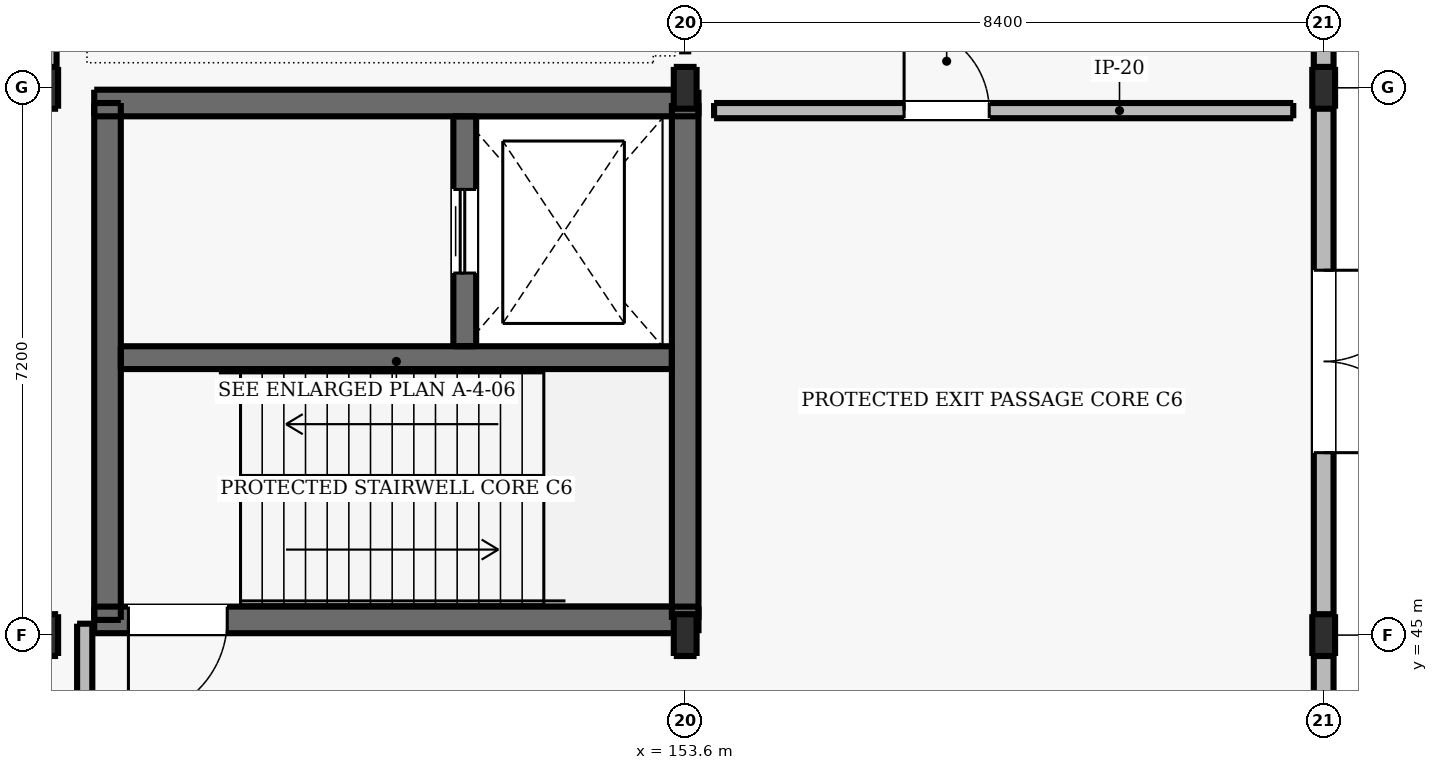
"""IFC4 building model, lengths in metres.
Left out: names, types, materials, properties, quantities, classifications, styles, units other than length and angle.
Written with IfcOpenShell. Run it as: python <this file> out.ifc"""

import sys

from ifc_helpers import new_model, si_unit, direction, frame, frame_2d, origin, origin_2d, place, context, subcontext, project, spatial, rectangle, i_section, extrude, element, fill, save


model = new_model("IFC4")
c1 = context("Model", 3, precision=1e-05, world=origin(), true_north=direction((0.0, 1.0)))
c2 = subcontext(c1, "Body", "Model", "MODEL_VIEW")
j1 = project(units=[si_unit("LENGTHUNIT", "METRE"), si_unit("PLANEANGLEUNIT", "RADIAN")], contexts=[c1])
p1 = place(None, origin())
s1 = spatial("IfcSite", under=j1, at=p1, CompositionType="ELEMENT")
p2 = place(p1, origin())
s2 = spatial("IfcBuilding", under=s1, at=p2, CompositionType="ELEMENT")
p3 = place(p2, origin())
s3 = spatial("IfcBuildingStorey", under=s2, at=p3, CompositionType="ELEMENT", Elevation=0.0)
for number, where, z_axis, x_axis in (
    (1, (145.2, 45.0, 0.0), (0.0, 0.0, 1.0), (1.0, 0.0, 0.0)),
    (2, (145.2, 52.2, 0.0), (0.0, 0.0, 1.0), (1.0, 0.0, 0.0)),
    (3, (153.6, 45.0, 0.0), (0.0, 0.0, 1.0), (1.0, 0.0, 0.0)),
    (4, (153.6, 52.2, 0.0), (0.0, 0.0, 1.0), (1.0, 0.0, 0.0)),
    (5, (162.0, 45.0, 0.0), (0.0, 0.0, 1.0), (1.0, 0.0, 0.0)),
    (6, (162.0, 52.2, 0.0), (0.0, 0.0, 1.0), (1.0, 0.0, 0.0)),
):
    element("IfcColumn", number, at=place(p3, frame(where, z_axis=z_axis, x_axis=x_axis)), inside=s3, PredefinedType="COLUMN", context=c2, shape_type="SweptSolid", body=[
        extrude(i_section(OverallWidth=0.3, OverallDepth=0.55, WebThickness=0.015, FlangeThickness=0.029, FilletRadius=0.027, at=origin_2d()), origin(), (0.0, 0.0, 1.0), 5.1),
    ])
p4 = place(p3, frame((145.825, 45.2, 0.0), z_axis=(0.0, 0.0, 1.0), x_axis=(1.0, 0.0, 0.0)))
e7 = element("IfcWall", 7, at=p4, inside=s3, PredefinedType="SHEAR", context=c2, shape_type="SweptSolid", body=[
    extrude(rectangle(XDim=7.95, YDim=0.35, at=frame_2d((3.975, 0.0))), origin(), (0.0, 0.0, 1.0), 5.1),
])
p5 = place(p4, frame((0.45, 0.0, 0.0)))
e8 = element("IfcOpeningElement", 8, at=p5, cuts=e7, PredefinedType="OPENING", context=c2, shape_type="SweptSolid", body=[
    extrude(rectangle(XDim=1.3, YDim=2.15, at=frame_2d((0.65, 1.075))), frame((0.0, 0.185, 0.0), z_axis=(0.0, -1.0, 0.0), x_axis=(1.0, 0.0, 0.0)), (0.0, 0.0, 1.0), 0.37),
])
p6 = place(p3, frame((145.825, 52.0, 0.0), z_axis=(0.0, 0.0, 1.0), x_axis=(1.0, 0.0, 0.0)))
e9 = element("IfcWall", 9, at=p6, inside=s3, PredefinedType="SHEAR", context=c2, shape_type="SweptSolid", body=[
    extrude(rectangle(XDim=7.95, YDim=0.35, at=frame_2d((3.975, 0.0))), origin(), (0.0, 0.0, 1.0), 5.1),
])
for number, where, z_axis, x_axis in (
    (10, (146.0, 45.2, 0.0), (0.0, 0.0, 1.0), (0.0, 1.0, 0.0)),
    (11, (153.6, 45.2, 0.0), (0.0, 0.0, 1.0), (0.0, 1.0, 0.0)),
):
    element("IfcWall", number, at=place(p3, frame(where, z_axis=z_axis, x_axis=x_axis)), inside=s3, PredefinedType="SHEAR", context=c2, shape_type="SweptSolid", body=[
        extrude(rectangle(XDim=6.8, YDim=0.35, at=frame_2d((3.4, 0.0))), origin(), (0.0, 0.0, 1.0), 5.1),
    ])
p7 = place(p3, frame((146.175, 48.65, 0.0), z_axis=(0.0, 0.0, 1.0), x_axis=(1.0, 0.0, 0.0)))
e12 = element("IfcWall", 12, at=p7, inside=s3, PredefinedType="SHEAR", context=c2, shape_type="SweptSolid", body=[
    extrude(rectangle(XDim=7.25, YDim=0.3, at=frame_2d((3.625, 0.0))), origin(), (0.0, 0.0, 1.0), 5.1),
])
p8 = place(p3, frame((150.7, 48.8, 0.0), z_axis=(0.0, 0.0, 1.0), x_axis=(0.0, 1.0, 0.0)))
e13 = element("IfcWall", 13, at=p8, inside=s3, PredefinedType="SHEAR", context=c2, shape_type="SweptSolid", body=[
    extrude(rectangle(XDim=3.025, YDim=0.3, at=frame_2d((1.512, 0.0))), origin(), (0.0, 0.0, 1.0), 5.1),
])
p9 = place(p8, frame((0.963, 0.0, 0.0)))
e14 = element("IfcOpeningElement", 14, at=p9, cuts=e13, PredefinedType="OPENING", context=c2, shape_type="SweptSolid", body=[
    extrude(rectangle(XDim=1.1, YDim=2.15, at=frame_2d((0.55, 1.075))), frame((0.0, 0.16, 0.0), z_axis=(0.0, -1.0, 0.0), x_axis=(1.0, 0.0, 0.0)), (0.0, 0.0, 1.0), 0.32),
])
p10 = place(p3, frame((145.2, 52.2, 0.0), z_axis=(0.0, 0.0, 1.0), x_axis=(0.0, 1.0, 0.0)))
e15 = element("IfcWall", 15, at=p10, inside=s3, PredefinedType="SOLIDWALL", context=c2, shape_type="SweptSolid", body=[
    extrude(rectangle(XDim=43.6, YDim=0.26, at=frame_2d((21.8, 0.0))), origin(), (0.0, 0.0, 1.0), 4.31),
])
p11 = place(p10, frame((1.522, 0.0, 1.05)))
e16 = element("IfcOpeningElement", 16, at=p11, cuts=e15, PredefinedType="OPENING", context=c2, shape_type="SweptSolid", body=[
    extrude(rectangle(XDim=1.8, YDim=1.65, at=frame_2d((0.9, 0.825))), frame((0.0, 0.14, 0.0), z_axis=(0.0, -1.0, 0.0), x_axis=(1.0, 0.0, 0.0)), (0.0, 0.0, 1.0), 0.28),
])
p12 = place(p10, frame((6.367, 0.0, 1.05)))
e17 = element("IfcOpeningElement", 17, at=p12, cuts=e15, PredefinedType="OPENING", context=c2, shape_type="SweptSolid", body=[
    extrude(rectangle(XDim=1.8, YDim=1.65, at=frame_2d((0.9, 0.825))), frame((0.0, 0.14, 0.0), z_axis=(0.0, -1.0, 0.0), x_axis=(1.0, 0.0, 0.0)), (0.0, 0.0, 1.0), 0.28),
])
p13 = place(p10, frame((16.056, 0.0, 1.05)))
e18 = element("IfcOpeningElement", 18, at=p13, cuts=e15, PredefinedType="OPENING", context=c2, shape_type="SweptSolid", body=[
    extrude(rectangle(XDim=1.8, YDim=1.65, at=frame_2d((0.9, 0.825))), frame((0.0, 0.14, 0.0), z_axis=(0.0, -1.0, 0.0), x_axis=(1.0, 0.0, 0.0)), (0.0, 0.0, 1.0), 0.28),
])
p14 = place(p10, frame((20.9, 0.0, 1.05)))
e19 = element("IfcOpeningElement", 19, at=p14, cuts=e15, PredefinedType="OPENING", context=c2, shape_type="SweptSolid", body=[
    extrude(rectangle(XDim=1.8, YDim=1.65, at=frame_2d((0.9, 0.825))), frame((0.0, 0.14, 0.0), z_axis=(0.0, -1.0, 0.0), x_axis=(1.0, 0.0, 0.0)), (0.0, 0.0, 1.0), 0.28),
])
p15 = place(p10, frame((25.744, 0.0, 1.05)))
e20 = element("IfcOpeningElement", 20, at=p15, cuts=e15, PredefinedType="OPENING", context=c2, shape_type="SweptSolid", body=[
    extrude(rectangle(XDim=1.8, YDim=1.65, at=frame_2d((0.9, 0.825))), frame((0.0, 0.14, 0.0), z_axis=(0.0, -1.0, 0.0), x_axis=(1.0, 0.0, 0.0)), (0.0, 0.0, 1.0), 0.28),
])
p16 = place(p10, frame((30.589, 0.0, 1.05)))
e21 = element("IfcOpeningElement", 21, at=p16, cuts=e15, PredefinedType="OPENING", context=c2, shape_type="SweptSolid", body=[
    extrude(rectangle(XDim=1.8, YDim=1.65, at=frame_2d((0.9, 0.825))), frame((0.0, 0.14, 0.0), z_axis=(0.0, -1.0, 0.0), x_axis=(1.0, 0.0, 0.0)), (0.0, 0.0, 1.0), 0.28),
])
p17 = place(p10, frame((40.278, 0.0, 1.05)))
e22 = element("IfcOpeningElement", 22, at=p17, cuts=e15, PredefinedType="OPENING", context=c2, shape_type="SweptSolid", body=[
    extrude(rectangle(XDim=1.8, YDim=1.65, at=frame_2d((0.9, 0.825))), frame((0.0, 0.14, 0.0), z_axis=(0.0, -1.0, 0.0), x_axis=(1.0, 0.0, 0.0)), (0.0, 0.0, 1.0), 0.28),
])
p18 = place(p3, frame((162.0, 95.8, 0.0), z_axis=(0.0, 0.0, 1.0), x_axis=(0.0, -1.0, 0.0)))
e23 = element("IfcWall", 23, at=p18, inside=s3, PredefinedType="SOLIDWALL", context=c2, shape_type="SweptSolid", body=[
    extrude(rectangle(XDim=43.6, YDim=0.26, at=frame_2d((21.8, 0.0))), origin(), (0.0, 0.0, 1.0), 4.31),
])
p19 = place(p18, frame((10.811, 0.0, 1.05)))
e24 = element("IfcOpeningElement", 24, at=p19, cuts=e23, PredefinedType="OPENING", context=c2, shape_type="SweptSolid", body=[
    extrude(rectangle(XDim=2.6, YDim=1.75, at=frame_2d((1.3, 0.875))), frame((0.0, 0.14, 0.0), z_axis=(0.0, -1.0, 0.0), x_axis=(1.0, 0.0, 0.0)), (0.0, 0.0, 1.0), 0.28),
])
p20 = place(p18, frame((15.656, 0.0, 1.05)))
e25 = element("IfcOpeningElement", 25, at=p20, cuts=e23, PredefinedType="OPENING", context=c2, shape_type="SweptSolid", body=[
    extrude(rectangle(XDim=2.6, YDim=1.75, at=frame_2d((1.3, 0.875))), frame((0.0, 0.14, 0.0), z_axis=(0.0, -1.0, 0.0), x_axis=(1.0, 0.0, 0.0)), (0.0, 0.0, 1.0), 0.28),
])
p21 = place(p18, frame((20.5, 0.0, 1.05)))
e26 = element("IfcOpeningElement", 26, at=p21, cuts=e23, PredefinedType="OPENING", context=c2, shape_type="SweptSolid", body=[
    extrude(rectangle(XDim=2.6, YDim=1.75, at=frame_2d((1.3, 0.875))), frame((0.0, 0.14, 0.0), z_axis=(0.0, -1.0, 0.0), x_axis=(1.0, 0.0, 0.0)), (0.0, 0.0, 1.0), 0.28),
])
p22 = place(p18, frame((35.033, 0.0, 1.05)))
e27 = element("IfcOpeningElement", 27, at=p22, cuts=e23, PredefinedType="OPENING", context=c2, shape_type="SweptSolid", body=[
    extrude(rectangle(XDim=2.6, YDim=1.75, at=frame_2d((1.3, 0.875))), frame((0.0, 0.14, 0.0), z_axis=(0.0, -1.0, 0.0), x_axis=(1.0, 0.0, 0.0)), (0.0, 0.0, 1.0), 0.28),
])
p23 = place(p18, frame((39.878, 0.0, 1.05)))
e28 = element("IfcOpeningElement", 28, at=p23, cuts=e23, PredefinedType="OPENING", context=c2, shape_type="SweptSolid", body=[
    extrude(rectangle(XDim=2.6, YDim=1.75, at=frame_2d((1.3, 0.875))), frame((0.0, 0.14, 0.0), z_axis=(0.0, -1.0, 0.0), x_axis=(1.0, 0.0, 0.0)), (0.0, 0.0, 1.0), 0.28),
])
p24 = place(p3, frame((162.0, 52.2, 0.0), z_axis=(0.0, 0.0, 1.0), x_axis=(0.0, -1.0, 0.0)))
e29 = element("IfcWall", 29, at=p24, inside=s3, PredefinedType="SOLIDWALL", context=c2, shape_type="SweptSolid", body=[
    extrude(rectangle(XDim=34.2, YDim=0.26, at=frame_2d((17.1, 0.0))), origin(), (0.0, 0.0, 1.0), 4.31),
])
p25 = place(p24, frame((27.6, 0.0, 0.0)))
e30 = element("IfcOpeningElement", 30, at=p25, cuts=e29, PredefinedType="OPENING", context=c2, shape_type="SweptSolid", body=[
    extrude(rectangle(XDim=5.2, YDim=3.2, at=frame_2d((2.6, 1.6))), frame((0.0, 0.14, 0.0), z_axis=(0.0, -1.0, 0.0), x_axis=(1.0, 0.0, 0.0)), (0.0, 0.0, 1.0), 0.28),
])
p26 = place(p24, frame((19.5, 0.0, 0.0)))
e31 = element("IfcOpeningElement", 31, at=p26, cuts=e29, PredefinedType="OPENING", context=c2, shape_type="SweptSolid", body=[
    extrude(rectangle(XDim=2.4, YDim=2.5, at=frame_2d((1.2, 1.25))), frame((0.0, 0.14, 0.0), z_axis=(0.0, -1.0, 0.0), x_axis=(1.0, 0.0, 0.0)), (0.0, 0.0, 1.0), 0.28),
])
p27 = place(p24, frame((2.4, 0.0, 0.0)))
e32 = element("IfcOpeningElement", 32, at=p27, cuts=e29, PredefinedType="OPENING", context=c2, shape_type="SweptSolid", body=[
    extrude(rectangle(XDim=2.4, YDim=2.5, at=frame_2d((1.2, 1.25))), frame((0.0, 0.14, 0.0), z_axis=(0.0, -1.0, 0.0), x_axis=(1.0, 0.0, 0.0)), (0.0, 0.0, 1.0), 0.28),
])
p28 = place(p3, frame((145.7, 42.2, 0.0), z_axis=(0.0, 0.0, 1.0), x_axis=(0.0, 1.0, 0.0)))
e33 = element("IfcWall", 33, at=p28, inside=s3, PredefinedType="PARTITIONING", context=c2, shape_type="SweptSolid", body=[
    extrude(rectangle(XDim=2.95, YDim=0.2, at=frame_2d((1.475, 0.0))), origin(), (0.0, 0.0, 1.0), 4.82),
])
p29 = place(p28, frame((0.925, 0.0, 0.0)))
e34 = element("IfcOpeningElement", 34, at=p29, cuts=e33, PredefinedType="OPENING", context=c2, shape_type="SweptSolid", body=[
    extrude(rectangle(XDim=1.12, YDim=2.15, at=frame_2d((0.56, 1.075))), frame((0.0, 0.11, 0.0), z_axis=(0.0, -1.0, 0.0), x_axis=(1.0, 0.0, 0.0)), (0.0, 0.0, 1.0), 0.22),
])
p30 = place(p3, frame((153.98, 51.9, 0.0), z_axis=(0.0, 0.0, 1.0), x_axis=(1.0, 0.0, 0.0)))
e35 = element("IfcWall", 35, at=p30, inside=s3, PredefinedType="PARTITIONING", context=c2, shape_type="SweptSolid", body=[
    extrude(rectangle(XDim=7.62, YDim=0.2, at=frame_2d((3.81, 0.0))), origin(), (0.0, 0.0, 1.0), 4.82),
])
p31 = place(p30, frame((2.5, 0.0, 0.0)))
e36 = element("IfcOpeningElement", 36, at=p31, cuts=e35, PredefinedType="OPENING", context=c2, shape_type="SweptSolid", body=[
    extrude(rectangle(XDim=1.12, YDim=2.15, at=frame_2d((0.56, 1.075))), frame((0.0, 0.11, 0.0), z_axis=(0.0, -1.0, 0.0), x_axis=(1.0, 0.0, 0.0)), (0.0, 0.0, 1.0), 0.22),
])
p32 = place(p27, origin())
e37 = element("IfcDoor", 37, at=p32, inside=s3, OperationType="DOUBLE_DOOR_SINGLE_SWING", PredefinedType="DOOR", context=c2, shape_type="SweptSolid", body=[
    extrude(rectangle(XDim=2.4, YDim=2.5, at=frame_2d((1.2, 1.25))), frame((0.0, 0.025, 0.0), z_axis=(0.0, -1.0, 0.0), x_axis=(1.0, 0.0, 0.0)), (0.0, 0.0, 1.0), 0.05),
])
fill(e32, e37)
p33 = place(p9, origin())
e38 = element("IfcDoor", 38, at=p33, inside=s3, OperationType="DOUBLE_DOOR_SLIDING", PredefinedType="DOOR", context=c2, shape_type="SweptSolid", body=[
    extrude(rectangle(XDim=1.1, YDim=2.15, at=frame_2d((0.55, 1.075))), frame((0.0, 0.025, 0.0), z_axis=(0.0, -1.0, 0.0), x_axis=(1.0, 0.0, 0.0)), (0.0, 0.0, 1.0), 0.05),
])
fill(e14, e38)
p34 = place(p5, frame((1.3, 0.0, 0.0), z_axis=(0.0, 0.0, 1.0), x_axis=(-1.0, 0.0, 0.0)))
e39 = element("IfcDoor", 39, at=p34, inside=s3, OperationType="SINGLE_SWING_LEFT", PredefinedType="DOOR", context=c2, shape_type="SweptSolid", body=[
    extrude(rectangle(XDim=1.3, YDim=2.15, at=frame_2d((0.65, 1.075))), frame((0.0, 0.025, 0.0), z_axis=(0.0, -1.0, 0.0), x_axis=(1.0, 0.0, 0.0)), (0.0, 0.0, 1.0), 0.05),
])
fill(e8, e39)
p35 = place(p31, origin())
e40 = element("IfcDoor", 40, at=p35, inside=s3, OperationType="SINGLE_SWING_LEFT", PredefinedType="DOOR", context=c2, shape_type="SweptSolid", body=[
    extrude(rectangle(XDim=1.12, YDim=2.15, at=frame_2d((0.56, 1.075))), frame((0.0, 0.025, 0.0), z_axis=(0.0, -1.0, 0.0), x_axis=(1.0, 0.0, 0.0)), (0.0, 0.0, 1.0), 0.05),
])
fill(e36, e40)
save(model, sys.argv[1])
